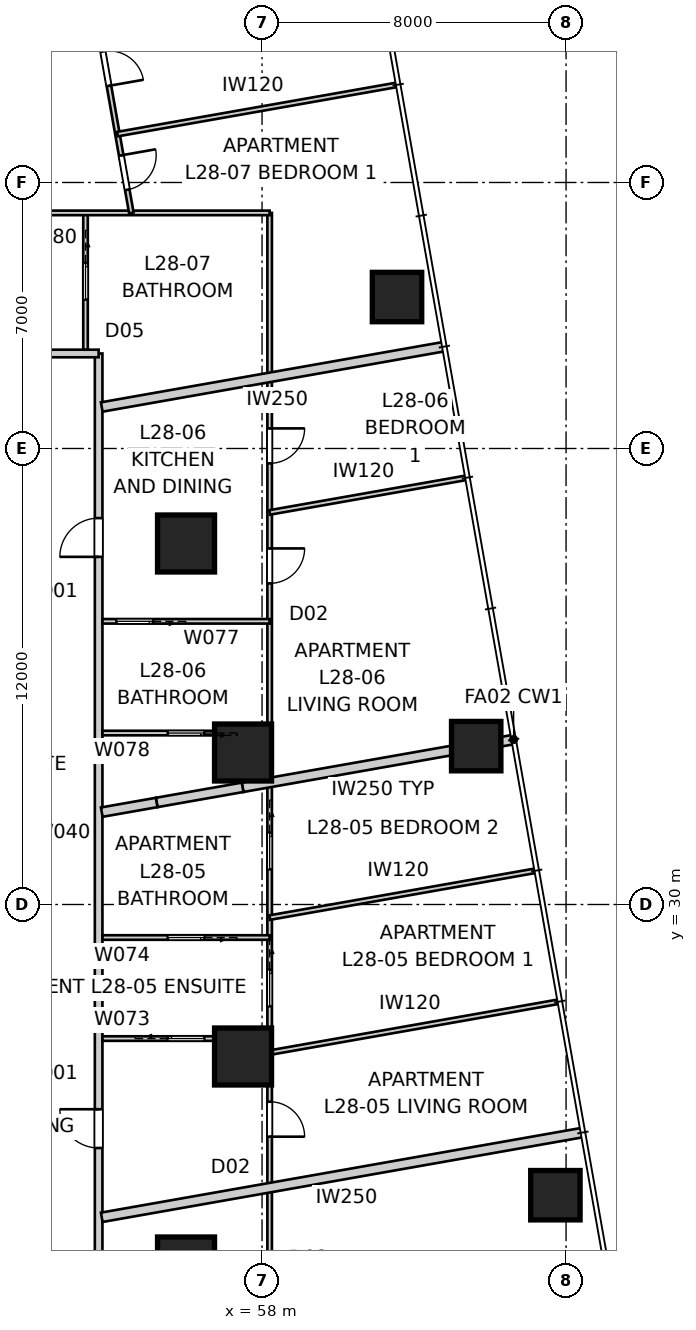
"""IFC4 building model, lengths in metres.
Left out: names, types, materials, properties, quantities, classifications, styles, units other than length and angle.
Written with IfcOpenShell. Run it as: python <this file> out.ifc"""

import sys

from ifc_helpers import new_model, si_unit, direction, frame, frame_2d, origin, origin_2d, place, context, subcontext, project, spatial, rectangle, extrude, element, fill, save


model = new_model("IFC4")
c1 = context("Model", 3, precision=1e-05, world=origin(), true_north=direction((0.0, 1.0)))
c2 = subcontext(c1, "Body", "Model", "MODEL_VIEW")
j1 = project(units=[si_unit("LENGTHUNIT", "METRE"), si_unit("PLANEANGLEUNIT", "RADIAN")], contexts=[c1])
p1 = place(None, origin())
s1 = spatial("IfcSite", under=j1, at=p1, CompositionType="ELEMENT")
p2 = place(p1, origin())
s2 = spatial("IfcBuilding", under=s1, at=p2, CompositionType="ELEMENT")
p3 = place(p2, frame((0.0, 0.0, 103.2)))
s3 = spatial("IfcBuildingStorey", under=s2, at=p3, CompositionType="ELEMENT", Elevation=103.2)
for number, where, z_axis, x_axis in (
    (1, (65.719, 22.35, 0.0), (0.0, 0.0, 1.0), (1.0, 0.0, 0.0)),
    (2, (63.635, 34.167, 0.0), (0.0, 0.0, 1.0), (1.0, 0.0, 0.0)),
    (3, (61.552, 45.985, 0.0), (0.0, 0.0, 1.0), (1.0, 0.0, 0.0)),
):
    element("IfcColumn", number, at=place(p3, frame(where, z_axis=z_axis, x_axis=x_axis)), inside=s3, PredefinedType="COLUMN", context=c2, shape_type="SweptSolid", body=[
        extrude(rectangle(XDim=1.3, YDim=1.3, at=origin_2d()), origin(), (0.0, 0.0, 1.0), 3.2),
    ])
for number, where, z_axis, x_axis in (
    (4, (57.5, 26.0, 0.0), (0.0, 0.0, 1.0), (1.0, 0.0, 0.0)),
    (5, (57.5, 34.0, 0.0), (0.0, 0.0, 1.0), (1.0, 0.0, 0.0)),
    (6, (56.0, 39.5, 0.0), (0.0, 0.0, 1.0), (1.0, 0.0, 0.0)),
    (7, (56.0, 20.5, 0.0), (0.0, 0.0, 1.0), (1.0, 0.0, 0.0)),
):
    element("IfcColumn", number, at=place(p3, frame(where, z_axis=z_axis, x_axis=x_axis)), inside=s3, PredefinedType="COLUMN", context=c2, shape_type="SweptSolid", body=[
        extrude(rectangle(XDim=1.5, YDim=1.5, at=origin_2d()), origin(), (0.0, 0.0, 1.0), 3.4),
    ])
p4 = place(p3, frame((53.7, 15.5, 0.0), z_axis=(0.0, 0.0, 1.0), x_axis=(0.0, 1.0, 0.0)))
e8 = element("IfcWall", 8, at=p4, inside=s3, PredefinedType="PARTITIONING", context=c2, shape_type="SweptSolid", body=[
    extrude(rectangle(XDim=29.0, YDim=0.2, at=frame_2d((14.5, 0.0))), origin(), (0.0, 0.0, 1.0), 3.2),
])
p5 = place(p4, frame((23.648, 0.0, 0.0)))
e9 = element("IfcOpeningElement", 9, at=p5, cuts=e8, PredefinedType="OPENING", context=c2, shape_type="SweptSolid", body=[
    extrude(rectangle(XDim=1.02, YDim=2.34, at=frame_2d((0.51, 1.17))), frame((0.0, 0.11, 0.0), z_axis=(0.0, -1.0, 0.0), x_axis=(1.0, 0.0, 0.0)), (0.0, 0.0, 1.0), 0.22),
])
p6 = place(p4, frame((2.376, 0.0, 0.0)))
e10 = element("IfcOpeningElement", 10, at=p6, cuts=e8, PredefinedType="OPENING", context=c2, shape_type="SweptSolid", body=[
    extrude(rectangle(XDim=1.02, YDim=2.0, at=frame_2d((0.51, 1.0))), frame((0.0, 0.11, 0.0), z_axis=(0.0, -1.0, 0.0), x_axis=(1.0, 0.0, 0.0)), (0.0, 0.0, 1.0), 0.22),
])
p7 = place(p4, frame((8.092, 0.0, 0.0)))
e11 = element("IfcOpeningElement", 11, at=p7, cuts=e8, PredefinedType="OPENING", context=c2, shape_type="SweptSolid", body=[
    extrude(rectangle(XDim=1.02, YDim=2.34, at=frame_2d((0.51, 1.17))), frame((0.0, 0.11, 0.0), z_axis=(0.0, -1.0, 0.0), x_axis=(1.0, 0.0, 0.0)), (0.0, 0.0, 1.0), 0.22),
])
p8 = place(p3, frame((53.7, 44.5, 0.0), z_axis=(0.0, 0.0, 1.0), x_axis=(-1.0, 0.0, 0.0)))
e12 = element("IfcWall", 12, at=p8, inside=s3, PredefinedType="PARTITIONING", context=c2, shape_type="SweptSolid", body=[
    extrude(rectangle(XDim=27.4, YDim=0.2, at=frame_2d((13.7, 0.0))), origin(), (0.0, 0.0, 1.0), 3.2),
])
p9 = place(p8, frame((24.356, 0.0, 0.0)))
e13 = element("IfcOpeningElement", 13, at=p9, cuts=e12, PredefinedType="OPENING", context=c2, shape_type="SweptSolid", body=[
    extrude(rectangle(XDim=1.02, YDim=2.0, at=frame_2d((0.51, 1.0))), frame((0.0, 0.11, 0.0), z_axis=(0.0, -1.0, 0.0), x_axis=(1.0, 0.0, 0.0)), (0.0, 0.0, 1.0), 0.22),
])
p10 = place(p8, frame((2.005, 0.0, 0.0)))
e14 = element("IfcOpeningElement", 14, at=p10, cuts=e12, PredefinedType="OPENING", context=c2, shape_type="SweptSolid", body=[
    extrude(rectangle(XDim=1.02, YDim=2.0, at=frame_2d((0.51, 1.0))), frame((0.0, 0.11, 0.0), z_axis=(0.0, -1.0, 0.0), x_axis=(1.0, 0.0, 0.0)), (0.0, 0.0, 1.0), 0.22),
])
p11 = place(p3, frame((66.444, 24.001, 0.0), z_axis=(0.0, 0.0, 1.0), x_axis=(-0.984809355703, -0.173639088111, 0.0)))
e15 = element("IfcWall", 15, at=p11, inside=s3, PredefinedType="PARTITIONING", context=c2, shape_type="SweptSolid", body=[
    extrude(rectangle(XDim=12.857, YDim=0.25, at=frame_2d((6.428, 0.0))), origin(), (0.0, 0.0, 1.0), 3.2),
])
p12 = place(p3, frame((62.797, 44.682, 0.0), z_axis=(0.0, 0.0, 1.0), x_axis=(-0.984810933893, -0.173630137029, 0.0)))
e16 = element("IfcWall", 16, at=p12, inside=s3, PredefinedType="PARTITIONING", context=c2, shape_type="SweptSolid", body=[
    extrude(rectangle(XDim=9.154, YDim=0.25, at=frame_2d((4.577, 0.0))), origin(), (0.0, 0.0, 1.0), 3.2),
])
p13 = place(p3, frame((64.62, 34.341, 0.0), z_axis=(0.0, 0.0, 1.0), x_axis=(-0.984806967559, -0.173652632134, 0.0)))
e17 = element("IfcWall", 17, at=p13, inside=s3, PredefinedType="PARTITIONING", context=c2, shape_type="SweptSolid", body=[
    extrude(rectangle(XDim=7.242, YDim=0.25, at=frame_2d((3.621, 0.0))), origin(), (0.0, 0.0, 1.0), 3.2),
])
p14 = place(p3, frame((57.488, 33.084, 0.0), z_axis=(0.0, 0.0, 1.0), x_axis=(-0.98479532969, -0.173718619099, 0.0)))
e18 = element("IfcWall", 18, at=p14, inside=s3, PredefinedType="PARTITIONING", context=c2, shape_type="SweptSolid", body=[
    extrude(rectangle(XDim=2.296, YDim=0.25, at=frame_2d((1.148, 0.0))), origin(), (0.0, 0.0, 1.0), 2.672),
])
p15 = place(p3, frame((55.227, 32.685, 0.0), z_axis=(0.0, 0.0, 1.0), x_axis=(-0.984817051632, -0.173595434317, 0.0)))
e19 = element("IfcWall", 19, at=p15, inside=s3, PredefinedType="PARTITIONING", context=c2, shape_type="SweptSolid", body=[
    extrude(rectangle(XDim=1.467, YDim=0.25, at=frame_2d((0.733, 0.0))), origin(), (0.0, 0.0, 1.0), 3.2),
])
p16 = place(p3, frame((58.2, 48.2, 0.0), z_axis=(0.0, 0.0, 1.0), x_axis=(0.0, -1.0, 0.0)))
e20 = element("IfcWall", 20, at=p16, inside=s3, PredefinedType="PARTITIONING", context=c2, shape_type="SweptSolid", body=[
    extrude(rectangle(XDim=36.4, YDim=0.12, at=frame_2d((18.2, 0.0))), origin(), (0.0, 0.0, 1.0), 3.2),
])
p17 = place(p16, frame((5.671, 0.0, 0.0)))
e21 = element("IfcOpeningElement", 21, at=p17, cuts=e20, PredefinedType="OPENING", context=c2, shape_type="SweptSolid", body=[
    extrude(rectangle(XDim=0.92, YDim=2.34, at=frame_2d((0.46, 1.17))), frame((0.0, 0.07, 0.0), z_axis=(0.0, -1.0, 0.0), x_axis=(1.0, 0.0, 0.0)), (0.0, 0.0, 1.0), 0.14),
])
p18 = place(p16, frame((8.83, 0.0, 0.0)))
e22 = element("IfcOpeningElement", 22, at=p18, cuts=e20, PredefinedType="OPENING", context=c2, shape_type="SweptSolid", body=[
    extrude(rectangle(XDim=0.92, YDim=2.34, at=frame_2d((0.46, 1.17))), frame((0.0, 0.07, 0.0), z_axis=(0.0, -1.0, 0.0), x_axis=(1.0, 0.0, 0.0)), (0.0, 0.0, 1.0), 0.14),
])
p19 = place(p16, frame((28.35, 0.0, 0.0)))
e23 = element("IfcOpeningElement", 23, at=p19, cuts=e20, PredefinedType="OPENING", context=c2, shape_type="SweptSolid", body=[
    extrude(rectangle(XDim=0.92, YDim=2.34, at=frame_2d((0.46, 1.17))), frame((0.0, 0.07, 0.0), z_axis=(0.0, -1.0, 0.0), x_axis=(1.0, 0.0, 0.0)), (0.0, 0.0, 1.0), 0.14),
])
p20 = place(p16, frame((23.39, 0.0, 0.0)))
e24 = element("IfcOpeningElement", 24, at=p20, cuts=e20, PredefinedType="OPENING", context=c2, shape_type="SweptSolid", body=[
    extrude(rectangle(XDim=0.92, YDim=2.34, at=frame_2d((0.46, 1.17))), frame((0.0, 0.07, 0.0), z_axis=(0.0, -1.0, 0.0), x_axis=(1.0, 0.0, 0.0)), (0.0, 0.0, 1.0), 0.14),
])
p21 = place(p16, frame((19.918, 0.0, 0.0)))
e25 = element("IfcOpeningElement", 25, at=p21, cuts=e20, PredefinedType="OPENING", context=c2, shape_type="SweptSolid", body=[
    extrude(rectangle(XDim=0.96, YDim=2.1, at=frame_2d((0.48, 1.05))), frame((0.0, 0.07, 0.0), z_axis=(0.0, -1.0, 0.0), x_axis=(1.0, 0.0, 0.0)), (0.0, 0.0, 1.0), 0.14),
])
p22 = place(p16, frame((16.313, 0.0, 0.0)))
e26 = element("IfcOpeningElement", 26, at=p22, cuts=e20, PredefinedType="OPENING", context=c2, shape_type="SweptSolid", body=[
    extrude(rectangle(XDim=0.96, YDim=2.1, at=frame_2d((0.48, 1.05))), frame((0.0, 0.07, 0.0), z_axis=(0.0, -1.0, 0.0), x_axis=(1.0, 0.0, 0.0)), (0.0, 0.0, 1.0), 0.14),
])
p23 = place(p3, frame((53.8, 26.472, 0.0), z_axis=(0.0, 0.0, 1.0), x_axis=(1.0, 0.0, 0.0)))
e27 = element("IfcWall", 27, at=p23, inside=s3, PredefinedType="PARTITIONING", context=c2, shape_type="SweptSolid", body=[
    extrude(rectangle(XDim=4.4, YDim=0.12, at=frame_2d((2.2, 0.0))), origin(), (0.0, 0.0, 1.0), 3.2),
])
p24 = place(p23, frame((1.72, 0.0, 0.0)))
e28 = element("IfcOpeningElement", 28, at=p24, cuts=e27, PredefinedType="OPENING", context=c2, shape_type="SweptSolid", body=[
    extrude(rectangle(XDim=0.96, YDim=2.1, at=frame_2d((0.48, 1.05))), frame((0.0, 0.07, 0.0), z_axis=(0.0, -1.0, 0.0), x_axis=(1.0, 0.0, 0.0)), (0.0, 0.0, 1.0), 0.14),
])
p25 = place(p3, frame((58.2, 29.131, 0.0), z_axis=(0.0, 0.0, 1.0), x_axis=(-1.0, 0.0, 0.0)))
e29 = element("IfcWall", 29, at=p25, inside=s3, PredefinedType="PARTITIONING", context=c2, shape_type="SweptSolid", body=[
    extrude(rectangle(XDim=4.4, YDim=0.12, at=frame_2d((2.2, 0.0))), origin(), (0.0, 0.0, 1.0), 3.2),
])
p26 = place(p25, frame((1.72, 0.0, 0.0)))
e30 = element("IfcOpeningElement", 30, at=p26, cuts=e29, PredefinedType="OPENING", context=c2, shape_type="SweptSolid", body=[
    extrude(rectangle(XDim=0.96, YDim=2.1, at=frame_2d((0.48, 1.05))), frame((0.0, 0.07, 0.0), z_axis=(0.0, -1.0, 0.0), x_axis=(1.0, 0.0, 0.0)), (0.0, 0.0, 1.0), 0.14),
])
p27 = place(p3, frame((58.2, 26.101, 0.0), z_axis=(0.0, 0.0, 1.0), x_axis=(0.984804581119, 0.173666165406, 0.0)))
e31 = element("IfcWall", 31, at=p27, inside=s3, PredefinedType="PARTITIONING", context=c2, shape_type="SweptSolid", body=[
    extrude(rectangle(XDim=7.714, YDim=0.12, at=frame_2d((3.857, 0.0))), origin(), (0.0, 0.0, 1.0), 3.2),
])
p28 = place(p3, frame((58.2, 29.655, 0.0), z_axis=(0.0, 0.0, 1.0), x_axis=(0.984809869921, 0.17363617165, 0.0)))
e32 = element("IfcWall", 32, at=p28, inside=s3, PredefinedType="PARTITIONING", context=c2, shape_type="SweptSolid", body=[
    extrude(rectangle(XDim=7.096, YDim=0.12, at=frame_2d((3.548, 0.0))), origin(), (0.0, 0.0, 1.0), 3.2),
])
p29 = place(p3, frame((58.2, 37.452, 0.0), z_axis=(0.0, 0.0, 1.0), x_axis=(-1.0, 0.0, 0.0)))
e33 = element("IfcWall", 33, at=p29, inside=s3, PredefinedType="PARTITIONING", context=c2, shape_type="SweptSolid", body=[
    extrude(rectangle(XDim=4.4, YDim=0.12, at=frame_2d((2.2, 0.0))), origin(), (0.0, 0.0, 1.0), 3.2),
])
p30 = place(p29, frame((3.07, 0.0, 0.0)))
e34 = element("IfcOpeningElement", 34, at=p30, cuts=e33, PredefinedType="OPENING", context=c2, shape_type="SweptSolid", body=[
    extrude(rectangle(XDim=0.96, YDim=2.1, at=frame_2d((0.48, 1.05))), frame((0.0, 0.07, 0.0), z_axis=(0.0, -1.0, 0.0), x_axis=(1.0, 0.0, 0.0)), (0.0, 0.0, 1.0), 0.14),
])
p31 = place(p3, frame((58.2, 34.512, 0.0), z_axis=(0.0, 0.0, 1.0), x_axis=(-1.0, 0.0, 0.0)))
e35 = element("IfcWall", 35, at=p31, inside=s3, PredefinedType="PARTITIONING", context=c2, shape_type="SweptSolid", body=[
    extrude(rectangle(XDim=4.4, YDim=0.12, at=frame_2d((2.2, 0.0))), origin(), (0.0, 0.0, 1.0), 3.2),
])
p32 = place(p31, frame((1.72, 0.0, 0.0)))
e36 = element("IfcOpeningElement", 36, at=p32, cuts=e35, PredefinedType="OPENING", context=c2, shape_type="SweptSolid", body=[
    extrude(rectangle(XDim=0.96, YDim=2.1, at=frame_2d((0.48, 1.05))), frame((0.0, 0.07, 0.0), z_axis=(0.0, -1.0, 0.0), x_axis=(1.0, 0.0, 0.0)), (0.0, 0.0, 1.0), 0.14),
])
p33 = place(p3, frame((58.2, 40.317, 0.0), z_axis=(0.0, 0.0, 1.0), x_axis=(0.984812130229, 0.173623351409, 0.0)))
e37 = element("IfcWall", 37, at=p33, inside=s3, PredefinedType="PARTITIONING", context=c2, shape_type="SweptSolid", body=[
    extrude(rectangle(XDim=5.245, YDim=0.12, at=frame_2d((2.623, 0.0))), origin(), (0.0, 0.0, 1.0), 3.2),
])
p34 = place(p3, frame((53.355, 48.2, 0.0), z_axis=(0.0, 0.0, 1.0), x_axis=(0.0, -1.0, 0.0)))
e38 = element("IfcWall", 38, at=p34, inside=s3, PredefinedType="PARTITIONING", context=c2, shape_type="SweptSolid", body=[
    extrude(rectangle(XDim=3.6, YDim=0.12, at=frame_2d((1.8, 0.0))), origin(), (0.0, 0.0, 1.0), 3.2),
])
p35 = place(p34, frame((1.32, 0.0, 0.0)))
e39 = element("IfcOpeningElement", 39, at=p35, cuts=e38, PredefinedType="OPENING", context=c2, shape_type="SweptSolid", body=[
    extrude(rectangle(XDim=0.96, YDim=2.1, at=frame_2d((0.48, 1.05))), frame((0.0, 0.07, 0.0), z_axis=(0.0, -1.0, 0.0), x_axis=(1.0, 0.0, 0.0)), (0.0, 0.0, 1.0), 0.14),
])
p36 = place(p3, frame((21.8, 48.2, 0.0), z_axis=(0.0, 0.0, 1.0), x_axis=(1.0, 0.0, 0.0)))
e40 = element("IfcWall", 40, at=p36, inside=s3, PredefinedType="PARTITIONING", context=c2, shape_type="SweptSolid", body=[
    extrude(rectangle(XDim=36.4, YDim=0.12, at=frame_2d((18.2, 0.0))), origin(), (0.0, 0.0, 1.0), 3.2),
])
p37 = place(p36, frame((7.441, 0.0, 0.0)))
e41 = element("IfcOpeningElement", 41, at=p37, cuts=e40, PredefinedType="OPENING", context=c2, shape_type="SweptSolid", body=[
    extrude(rectangle(XDim=0.92, YDim=2.34, at=frame_2d((0.46, 1.17))), frame((0.0, 0.07, 0.0), z_axis=(0.0, -1.0, 0.0), x_axis=(1.0, 0.0, 0.0)), (0.0, 0.0, 1.0), 0.14),
])
p38 = place(p36, frame((28.144, 0.0, 0.0)))
e42 = element("IfcOpeningElement", 42, at=p38, cuts=e40, PredefinedType="OPENING", context=c2, shape_type="SweptSolid", body=[
    extrude(rectangle(XDim=0.92, YDim=2.34, at=frame_2d((0.46, 1.17))), frame((0.0, 0.07, 0.0), z_axis=(0.0, -1.0, 0.0), x_axis=(1.0, 0.0, 0.0)), (0.0, 0.0, 1.0), 0.14),
])
p39 = place(p36, frame((12.29, 0.0, 0.0)))
e43 = element("IfcOpeningElement", 43, at=p39, cuts=e40, PredefinedType="OPENING", context=c2, shape_type="SweptSolid", body=[
    extrude(rectangle(XDim=0.92, YDim=2.34, at=frame_2d((0.46, 1.17))), frame((0.0, 0.07, 0.0), z_axis=(0.0, -1.0, 0.0), x_axis=(1.0, 0.0, 0.0)), (0.0, 0.0, 1.0), 0.14),
])
p40 = place(p36, frame((15.505, 0.0, 0.0)))
e44 = element("IfcOpeningElement", 44, at=p40, cuts=e40, PredefinedType="OPENING", context=c2, shape_type="SweptSolid", body=[
    extrude(rectangle(XDim=0.96, YDim=2.1, at=frame_2d((0.48, 1.05))), frame((0.0, 0.07, 0.0), z_axis=(0.0, -1.0, 0.0), x_axis=(1.0, 0.0, 0.0)), (0.0, 0.0, 1.0), 0.14),
])
p41 = place(p36, frame((18.991, 0.0, 0.0)))
e45 = element("IfcOpeningElement", 45, at=p41, cuts=e40, PredefinedType="OPENING", context=c2, shape_type="SweptSolid", body=[
    extrude(rectangle(XDim=0.96, YDim=2.1, at=frame_2d((0.48, 1.05))), frame((0.0, 0.07, 0.0), z_axis=(0.0, -1.0, 0.0), x_axis=(1.0, 0.0, 0.0)), (0.0, 0.0, 1.0), 0.14),
])
p42 = place(p3, frame((52.9, 57.62, 0.0), z_axis=(0.0, 0.0, 1.0), x_axis=(0.173642635155, -0.984808730291, 0.0)))
e46 = element("IfcWall", 46, at=p42, inside=s3, PredefinedType="PARTITIONING", context=c2, shape_type="SweptSolid", body=[
    extrude(rectangle(XDim=9.565, YDim=0.12, at=frame_2d((4.782, 0.0))), origin(), (0.0, 0.0, 1.0), 3.2),
])
p43 = place(p42, frame((1.525, 0.0, 0.0)))
e47 = element("IfcOpeningElement", 47, at=p43, cuts=e46, PredefinedType="OPENING", context=c2, shape_type="SweptSolid", body=[
    extrude(rectangle(XDim=0.92, YDim=2.34, at=frame_2d((0.46, 1.17))), frame((0.0, 0.07, 0.0), z_axis=(0.0, -1.0, 0.0), x_axis=(1.0, 0.0, 0.0)), (0.0, 0.0, 1.0), 0.14),
])
p44 = place(p42, frame((5.25, 0.0, 0.0)))
e48 = element("IfcOpeningElement", 48, at=p44, cuts=e46, PredefinedType="OPENING", context=c2, shape_type="SweptSolid", body=[
    extrude(rectangle(XDim=0.92, YDim=2.34, at=frame_2d((0.46, 1.17))), frame((0.0, 0.07, 0.0), z_axis=(0.0, -1.0, 0.0), x_axis=(1.0, 0.0, 0.0)), (0.0, 0.0, 1.0), 0.14),
])
p45 = place(p42, frame((8.028, 0.0, 0.0)))
e49 = element("IfcOpeningElement", 49, at=p45, cuts=e46, PredefinedType="OPENING", context=c2, shape_type="SweptSolid", body=[
    extrude(rectangle(XDim=0.92, YDim=2.0, at=frame_2d((0.46, 1.0))), frame((0.0, 0.07, 0.0), z_axis=(0.0, -1.0, 0.0), x_axis=(1.0, 0.0, 0.0)), (0.0, 0.0, 1.0), 0.14),
])
p46 = place(p3, frame((54.195, 50.273, 0.0), z_axis=(0.0, 0.0, 1.0), x_axis=(0.984807929323, 0.173647177755, 0.0)))
e50 = element("IfcWall", 50, at=p46, inside=s3, PredefinedType="PARTITIONING", context=c2, shape_type="SweptSolid", body=[
    extrude(rectangle(XDim=7.46, YDim=0.12, at=frame_2d((3.73, 0.0))), origin(), (0.0, 0.0, 1.0), 3.2),
])
p47 = place(p5, origin())
e51 = element("IfcDoor", 51, at=p47, inside=s3, OperationType="SINGLE_SWING_LEFT", PredefinedType="DOOR", context=c2, shape_type="SweptSolid", body=[
    extrude(rectangle(XDim=1.02, YDim=2.34, at=frame_2d((0.51, 1.17))), frame((0.0, 0.025, 0.0), z_axis=(0.0, -1.0, 0.0), x_axis=(1.0, 0.0, 0.0)), (0.0, 0.0, 1.0), 0.05),
])
fill(e9, e51)
p48 = place(p7, origin())
e52 = element("IfcDoor", 52, at=p48, inside=s3, OperationType="SINGLE_SWING_RIGHT", PredefinedType="DOOR", context=c2, shape_type="SweptSolid", body=[
    extrude(rectangle(XDim=1.02, YDim=2.34, at=frame_2d((0.51, 1.17))), frame((0.0, 0.025, 0.0), z_axis=(0.0, -1.0, 0.0), x_axis=(1.0, 0.0, 0.0)), (0.0, 0.0, 1.0), 0.05),
])
fill(e11, e52)
p49 = place(p30, origin())
e53 = element("IfcDoor", 53, at=p49, inside=s3, OperationType="SLIDING_TO_LEFT", PredefinedType="DOOR", context=c2, shape_type="SweptSolid", body=[
    extrude(rectangle(XDim=0.96, YDim=2.1, at=frame_2d((0.48, 1.05))), frame((0.0, 0.025, 0.0), z_axis=(0.0, -1.0, 0.0), x_axis=(1.0, 0.0, 0.0)), (0.0, 0.0, 1.0), 0.05),
])
fill(e34, e53)
p50 = place(p17, origin())
e54 = element("IfcDoor", 54, at=p50, inside=s3, OperationType="SINGLE_SWING_LEFT", PredefinedType="DOOR", context=c2, shape_type="SweptSolid", body=[
    extrude(rectangle(XDim=0.92, YDim=2.34, at=frame_2d((0.46, 1.17))), frame((0.0, 0.025, 0.0), z_axis=(0.0, -1.0, 0.0), x_axis=(1.0, 0.0, 0.0)), (0.0, 0.0, 1.0), 0.05),
])
fill(e21, e54)
p51 = place(p18, origin())
e55 = element("IfcDoor", 55, at=p51, inside=s3, OperationType="SINGLE_SWING_LEFT", PredefinedType="DOOR", context=c2, shape_type="SweptSolid", body=[
    extrude(rectangle(XDim=0.92, YDim=2.34, at=frame_2d((0.46, 1.17))), frame((0.0, 0.025, 0.0), z_axis=(0.0, -1.0, 0.0), x_axis=(1.0, 0.0, 0.0)), (0.0, 0.0, 1.0), 0.05),
])
fill(e22, e55)
p52 = place(p35, origin())
e56 = element("IfcDoor", 56, at=p52, inside=s3, OperationType="SLIDING_TO_LEFT", PredefinedType="DOOR", context=c2, shape_type="SweptSolid", body=[
    extrude(rectangle(XDim=0.96, YDim=2.1, at=frame_2d((0.48, 1.05))), frame((0.0, 0.025, 0.0), z_axis=(0.0, -1.0, 0.0), x_axis=(1.0, 0.0, 0.0)), (0.0, 0.0, 1.0), 0.05),
])
fill(e39, e56)
p53 = place(p24, origin())
e57 = element("IfcDoor", 57, at=p53, inside=s3, OperationType="SLIDING_TO_LEFT", PredefinedType="DOOR", context=c2, shape_type="SweptSolid", body=[
    extrude(rectangle(XDim=0.96, YDim=2.1, at=frame_2d((0.48, 1.05))), frame((0.0, 0.025, 0.0), z_axis=(0.0, -1.0, 0.0), x_axis=(1.0, 0.0, 0.0)), (0.0, 0.0, 1.0), 0.05),
])
fill(e28, e57)
p54 = place(p20, origin())
e58 = element("IfcDoor", 58, at=p54, inside=s3, OperationType="SINGLE_SWING_RIGHT", PredefinedType="DOOR", context=c2, shape_type="SweptSolid", body=[
    extrude(rectangle(XDim=0.92, YDim=2.34, at=frame_2d((0.46, 1.17))), frame((0.0, 0.025, 0.0), z_axis=(0.0, -1.0, 0.0), x_axis=(1.0, 0.0, 0.0)), (0.0, 0.0, 1.0), 0.05),
])
fill(e24, e58)
p55 = place(p32, origin())
e59 = element("IfcDoor", 59, at=p55, inside=s3, OperationType="SLIDING_TO_LEFT", PredefinedType="DOOR", context=c2, shape_type="SweptSolid", body=[
    extrude(rectangle(XDim=0.96, YDim=2.1, at=frame_2d((0.48, 1.05))), frame((0.0, 0.025, 0.0), z_axis=(0.0, -1.0, 0.0), x_axis=(1.0, 0.0, 0.0)), (0.0, 0.0, 1.0), 0.05),
])
fill(e36, e59)
p56 = place(p44, origin())
e60 = element("IfcDoor", 60, at=p56, inside=s3, OperationType="SINGLE_SWING_RIGHT", PredefinedType="DOOR", context=c2, shape_type="SweptSolid", body=[
    extrude(rectangle(XDim=0.92, YDim=2.34, at=frame_2d((0.46, 1.17))), frame((0.0, 0.025, 0.0), z_axis=(0.0, -1.0, 0.0), x_axis=(1.0, 0.0, 0.0)), (0.0, 0.0, 1.0), 0.05),
])
fill(e48, e60)
p57 = place(p45, origin())
e61 = element("IfcDoor", 61, at=p57, inside=s3, OperationType="SINGLE_SWING_LEFT", PredefinedType="DOOR", context=c2, shape_type="SweptSolid", body=[
    extrude(rectangle(XDim=0.92, YDim=2.0, at=frame_2d((0.46, 1.0))), frame((0.0, 0.025, 0.0), z_axis=(0.0, -1.0, 0.0), x_axis=(1.0, 0.0, 0.0)), (0.0, 0.0, 1.0), 0.05),
])
fill(e49, e61)
p58 = place(p26, origin())
e62 = element("IfcDoor", 62, at=p58, inside=s3, OperationType="SLIDING_TO_LEFT", PredefinedType="DOOR", context=c2, shape_type="SweptSolid", body=[
    extrude(rectangle(XDim=0.96, YDim=2.1, at=frame_2d((0.48, 1.05))), frame((0.0, 0.025, 0.0), z_axis=(0.0, -1.0, 0.0), x_axis=(1.0, 0.0, 0.0)), (0.0, 0.0, 1.0), 0.05),
])
fill(e30, e62)
p59 = place(p21, origin())
e63 = element("IfcDoor", 63, at=p59, inside=s3, OperationType="SLIDING_TO_LEFT", PredefinedType="DOOR", context=c2, shape_type="SweptSolid", body=[
    extrude(rectangle(XDim=0.96, YDim=2.1, at=frame_2d((0.48, 1.05))), frame((0.0, 0.025, 0.0), z_axis=(0.0, -1.0, 0.0), x_axis=(1.0, 0.0, 0.0)), (0.0, 0.0, 1.0), 0.05),
])
fill(e25, e63)
p60 = place(p22, origin())
e64 = element("IfcDoor", 64, at=p60, inside=s3, OperationType="SLIDING_TO_LEFT", PredefinedType="DOOR", context=c2, shape_type="SweptSolid", body=[
    extrude(rectangle(XDim=0.96, YDim=2.1, at=frame_2d((0.48, 1.05))), frame((0.0, 0.025, 0.0), z_axis=(0.0, -1.0, 0.0), x_axis=(1.0, 0.0, 0.0)), (0.0, 0.0, 1.0), 0.05),
])
fill(e26, e64)
save(model, sys.argv[1])
